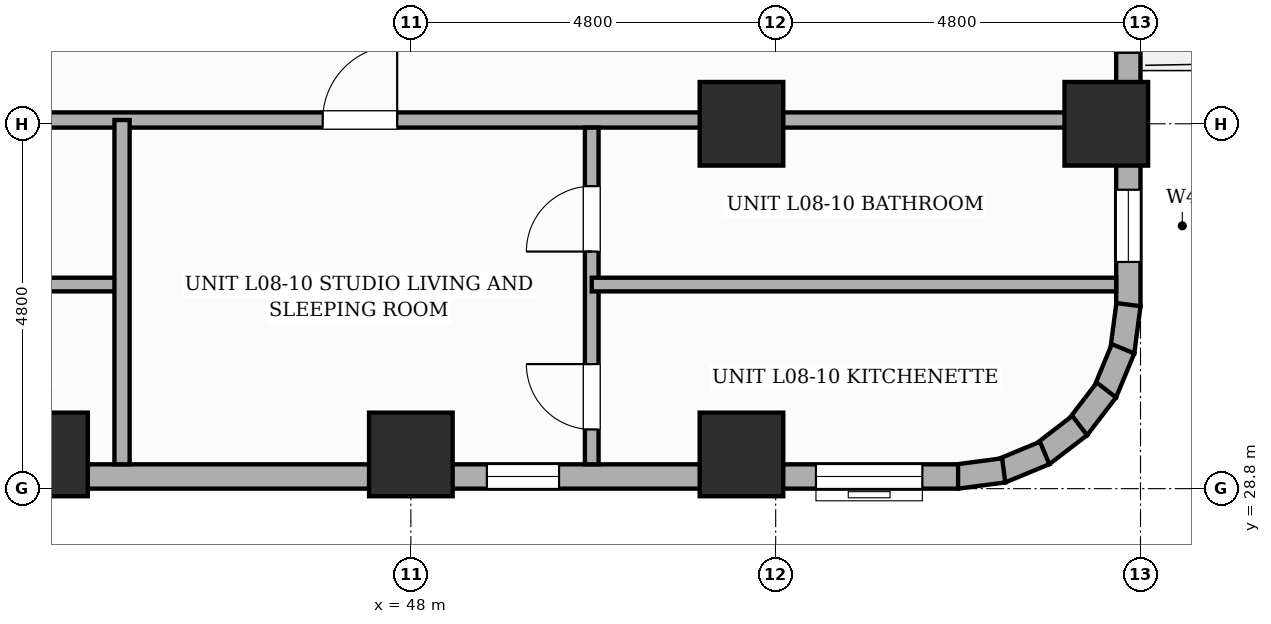
"""IFC4 building model, lengths in metres.
Left out: names, types, materials, properties, quantities, classifications, styles, units other than length and angle.
Written with IfcOpenShell. Run it as: python <this file> out.ifc"""

import sys

from ifc_helpers import new_model, si_unit, direction, frame, frame_2d, origin, origin_2d, place, context, subcontext, project, spatial, rectangle, extrude, element, fill, save


model = new_model("IFC4")
c1 = context("Model", 3, precision=1e-05, world=origin(), true_north=direction((0.0, 1.0)))
c2 = subcontext(c1, "Body", "Model", "MODEL_VIEW")
j1 = project(units=[si_unit("LENGTHUNIT", "METRE"), si_unit("PLANEANGLEUNIT", "RADIAN")], contexts=[c1])
p1 = place(None, origin())
s1 = spatial("IfcSite", under=j1, at=p1, CompositionType="ELEMENT")
p2 = place(p1, origin())
s2 = spatial("IfcBuilding", under=s1, at=p2, CompositionType="ELEMENT")
p3 = place(p2, frame((0.0, 0.0, 35.8)))
s3 = spatial("IfcBuildingStorey", under=s2, at=p3, CompositionType="ELEMENT", Elevation=35.8)
for number, where, z_axis, x_axis in (
    (1, (43.2, 29.25, 0.0), (0.0, 0.0, 1.0), (1.0, 0.0, 0.0)),
    (2, (48.0, 29.25, 0.0), (0.0, 0.0, 1.0), (1.0, 0.0, 0.0)),
    (3, (52.35, 29.25, 0.0), (0.0, 0.0, 1.0), (1.0, 0.0, 0.0)),
    (4, (52.35, 33.6, 0.0), (0.0, 0.0, 1.0), (1.0, 0.0, 0.0)),
    (5, (57.15, 33.6, 0.0), (0.0, 0.0, 1.0), (1.0, 0.0, 0.0)),
):
    element("IfcColumn", number, at=place(p3, frame(where, z_axis=z_axis, x_axis=x_axis)), inside=s3, PredefinedType="COLUMN", context=c2, shape_type="SweptSolid", body=[
        extrude(rectangle(XDim=1.1, YDim=1.1, at=origin_2d()), origin(), (0.0, 0.0, 1.0), 3.6),
    ])
p4 = place(p3, frame((57.44, 45.6, 0.0), z_axis=(0.0, 0.0, 1.0), x_axis=(0.0, -1.0, 0.0)))
e6 = element("IfcWall", 6, at=p4, inside=s3, PredefinedType="STANDARD", context=c2, shape_type="SweptSolid", body=[
    extrude(rectangle(XDim=14.4, YDim=0.32, at=frame_2d((7.2, 0.0))), origin(), (0.0, 0.0, 1.0), 2.53),
])
p5 = place(p4, frame((8.3, 0.0, 0.0)))
e7 = element("IfcOpeningElement", 7, at=p5, cuts=e6, PredefinedType="OPENING", context=c2, shape_type="SweptSolid", body=[
    extrude(rectangle(XDim=1.1, YDim=2.15, at=frame_2d((0.55, 1.075))), frame((0.0, 0.17, 0.0), z_axis=(0.0, -1.0, 0.0), x_axis=(1.0, 0.0, 0.0)), (0.0, 0.0, 1.0), 0.34),
])
p6 = place(p4, frame((0.47, 0.0, 0.45)))
e8 = element("IfcOpeningElement", 8, at=p6, cuts=e6, PredefinedType="OPENING", context=c2, shape_type="SweptSolid", body=[
    extrude(rectangle(XDim=0.95, YDim=1.8, at=frame_2d((0.475, 0.9))), frame((0.0, 0.17, 0.0), z_axis=(0.0, -1.0, 0.0), x_axis=(1.0, 0.0, 0.0)), (0.0, 0.0, 1.0), 0.34),
])
p7 = place(p4, frame((10.115, 0.0, 0.45)))
e9 = element("IfcOpeningElement", 9, at=p7, cuts=e6, PredefinedType="OPENING", context=c2, shape_type="SweptSolid", body=[
    extrude(rectangle(XDim=0.95, YDim=1.8, at=frame_2d((0.475, 0.9))), frame((0.0, 0.17, 0.0), z_axis=(0.0, -1.0, 0.0), x_axis=(1.0, 0.0, 0.0)), (0.0, 0.0, 1.0), 0.34),
])
p8 = place(p4, frame((12.867, 0.0, 0.45)))
e10 = element("IfcOpeningElement", 10, at=p8, cuts=e6, PredefinedType="OPENING", context=c2, shape_type="SweptSolid", body=[
    extrude(rectangle(XDim=0.95, YDim=1.8, at=frame_2d((0.475, 0.9))), frame((0.0, 0.17, 0.0), z_axis=(0.0, -1.0, 0.0), x_axis=(1.0, 0.0, 0.0)), (0.0, 0.0, 1.0), 0.34),
])
p9 = place(p4, frame((4.799, 0.0, 0.65)))
e11 = element("IfcOpeningElement", 11, at=p9, cuts=e6, PredefinedType="OPENING", context=c2, shape_type="SweptSolid", body=[
    extrude(rectangle(XDim=1.4, YDim=1.1, at=frame_2d((0.7, 0.55))), frame((0.0, 0.17, 0.0), z_axis=(0.0, -1.0, 0.0), x_axis=(1.0, 0.0, 0.0)), (0.0, 0.0, 1.0), 0.34),
])
p10 = place(p4, frame((3.194, 0.0, 0.45)))
e12 = element("IfcOpeningElement", 12, at=p10, cuts=e6, PredefinedType="OPENING", context=c2, shape_type="SweptSolid", body=[
    extrude(rectangle(XDim=0.95, YDim=1.8, at=frame_2d((0.475, 0.9))), frame((0.0, 0.17, 0.0), z_axis=(0.0, -1.0, 0.0), x_axis=(1.0, 0.0, 0.0)), (0.0, 0.0, 1.0), 0.34),
])
p11 = place(p3, frame((57.441, 31.221, 0.0), z_axis=(0.0, 0.0, 1.0), x_axis=(-0.130504898859, -0.991447664465, 0.0)))
e13 = element("IfcWall", 13, at=p11, inside=s3, PredefinedType="STANDARD", context=c2, shape_type="SweptSolid", body=[
    extrude(rectangle(XDim=0.627, YDim=0.32, at=frame_2d((0.313, 0.0))), origin(), (0.0, 0.0, 1.0), 3.35),
])
p12 = place(p3, frame((57.37, 30.64, 0.0), z_axis=(0.0, 0.0, 1.0), x_axis=(-0.382787856107, -0.923836271867, 0.0)))
e14 = element("IfcWall", 14, at=p12, inside=s3, PredefinedType="STANDARD", context=c2, shape_type="SweptSolid", body=[
    extrude(rectangle(XDim=0.626, YDim=0.32, at=frame_2d((0.313, 0.0))), origin(), (0.0, 0.0, 1.0), 3.35),
])
p13 = place(p3, frame((57.152, 30.097, 0.0), z_axis=(0.0, 0.0, 1.0), x_axis=(-0.608693302629, -0.793405610854, 0.0)))
e15 = element("IfcWall", 15, at=p13, inside=s3, PredefinedType="STANDARD", context=c2, shape_type="SweptSolid", body=[
    extrude(rectangle(XDim=0.626, YDim=0.32, at=frame_2d((0.313, 0.0))), origin(), (0.0, 0.0, 1.0), 3.35),
])
p14 = place(p3, frame((56.8, 29.63, 0.0), z_axis=(0.0, 0.0, 1.0), x_axis=(-0.793361818833, -0.608750379399, 0.0)))
e16 = element("IfcWall", 16, at=p14, inside=s3, PredefinedType="STANDARD", context=c2, shape_type="SweptSolid", body=[
    extrude(rectangle(XDim=0.627, YDim=0.32, at=frame_2d((0.313, 0.0))), origin(), (0.0, 0.0, 1.0), 3.35),
])
for number, where, z_axis, x_axis in (
    (17, (56.339, 29.269, 0.0), (0.0, 0.0, 1.0), (-0.924, -0.383, 0.0)),
    (18, (55.8, 29.04, 0.0), (0.0, 0.0, 1.0), (-0.991, -0.131, 0.0)),
):
    element("IfcWall", number, at=place(p3, frame(where, z_axis=z_axis, x_axis=x_axis)), inside=s3, PredefinedType="STANDARD", context=c2, shape_type="SweptSolid", body=[
        extrude(rectangle(XDim=0.626, YDim=0.32, at=frame_2d((0.313, 0.0))), origin(), (0.0, 0.0, 1.0), 3.35),
    ])
p15 = place(p3, frame((55.2, 28.96, 0.0), z_axis=(0.0, 0.0, 1.0), x_axis=(-1.0, 0.0, 0.0)))
e19 = element("IfcWall", 19, at=p15, inside=s3, PredefinedType="STANDARD", context=c2, shape_type="SweptSolid", body=[
    extrude(rectangle(XDim=28.8, YDim=0.32, at=frame_2d((14.4, 0.0))), origin(), (0.0, 0.0, 1.0), 2.53),
])
p16 = place(p15, frame((23.415, 0.0, 0.65)))
e20 = element("IfcOpeningElement", 20, at=p16, cuts=e19, PredefinedType="OPENING", context=c2, shape_type="SweptSolid", body=[
    extrude(rectangle(XDim=1.4, YDim=1.1, at=frame_2d((0.7, 0.55))), frame((0.0, 0.17, 0.0), z_axis=(0.0, -1.0, 0.0), x_axis=(1.0, 0.0, 0.0)), (0.0, 0.0, 1.0), 0.34),
])
p17 = place(p15, frame((15.034, 0.0, 0.45)))
e21 = element("IfcOpeningElement", 21, at=p17, cuts=e19, PredefinedType="OPENING", context=c2, shape_type="SweptSolid", body=[
    extrude(rectangle(XDim=0.95, YDim=1.8, at=frame_2d((0.475, 0.9))), frame((0.0, 0.17, 0.0), z_axis=(0.0, -1.0, 0.0), x_axis=(1.0, 0.0, 0.0)), (0.0, 0.0, 1.0), 0.34),
])
p18 = place(p15, frame((5.25, 0.0, 0.45)))
e22 = element("IfcOpeningElement", 22, at=p18, cuts=e19, PredefinedType="OPENING", context=c2, shape_type="SweptSolid", body=[
    extrude(rectangle(XDim=0.95, YDim=1.8, at=frame_2d((0.475, 0.9))), frame((0.0, 0.17, 0.0), z_axis=(0.0, -1.0, 0.0), x_axis=(1.0, 0.0, 0.0)), (0.0, 0.0, 1.0), 0.34),
])
p19 = place(p15, frame((12.979, 0.0, 0.65)))
e23 = element("IfcOpeningElement", 23, at=p19, cuts=e19, PredefinedType="OPENING", context=c2, shape_type="SweptSolid", body=[
    extrude(rectangle(XDim=1.4, YDim=1.1, at=frame_2d((0.7, 0.55))), frame((0.0, 0.17, 0.0), z_axis=(0.0, -1.0, 0.0), x_axis=(1.0, 0.0, 0.0)), (0.0, 0.0, 1.0), 0.34),
])
p20 = place(p15, frame((0.47, 0.0, 0.65)))
e24 = element("IfcOpeningElement", 24, at=p20, cuts=e19, PredefinedType="OPENING", context=c2, shape_type="SweptSolid", body=[
    extrude(rectangle(XDim=1.4, YDim=1.1, at=frame_2d((0.7, 0.55))), frame((0.0, 0.17, 0.0), z_axis=(0.0, -1.0, 0.0), x_axis=(1.0, 0.0, 0.0)), (0.0, 0.0, 1.0), 0.34),
])
p21 = place(p3, frame((22.75, 33.65, 0.0), z_axis=(0.0, 0.0, 1.0), x_axis=(1.0, 0.0, 0.0)))
e25 = element("IfcWall", 25, at=p21, inside=s3, PredefinedType="PARTITIONING", context=c2, shape_type="SweptSolid", body=[
    extrude(rectangle(XDim=34.53, YDim=0.2, at=frame_2d((17.265, 0.0))), origin(), (0.0, 0.0, 1.0), 2.53),
])
p22 = place(p21, frame((6.491, 0.0, 0.0)))
e26 = element("IfcOpeningElement", 26, at=p22, cuts=e25, PredefinedType="OPENING", context=c2, shape_type="SweptSolid", body=[
    extrude(rectangle(XDim=0.98, YDim=2.18, at=frame_2d((0.49, 1.09))), frame((0.0, 0.11, 0.0), z_axis=(0.0, -1.0, 0.0), x_axis=(1.0, 0.0, 0.0)), (0.0, 0.0, 1.0), 0.22),
])
p23 = place(p21, frame((13.406, 0.0, 0.0)))
e27 = element("IfcOpeningElement", 27, at=p23, cuts=e25, PredefinedType="OPENING", context=c2, shape_type="SweptSolid", body=[
    extrude(rectangle(XDim=0.98, YDim=2.18, at=frame_2d((0.49, 1.09))), frame((0.0, 0.11, 0.0), z_axis=(0.0, -1.0, 0.0), x_axis=(1.0, 0.0, 0.0)), (0.0, 0.0, 1.0), 0.22),
])
p24 = place(p21, frame((24.09, 0.0, 0.0)))
e28 = element("IfcOpeningElement", 28, at=p24, cuts=e25, PredefinedType="OPENING", context=c2, shape_type="SweptSolid", body=[
    extrude(rectangle(XDim=0.98, YDim=2.18, at=frame_2d((0.49, 1.09))), frame((0.0, 0.11, 0.0), z_axis=(0.0, -1.0, 0.0), x_axis=(1.0, 0.0, 0.0)), (0.0, 0.0, 1.0), 0.22),
])
p25 = place(p3, frame((40.412, 31.485, 0.0), z_axis=(0.0, 0.0, 1.0), x_axis=(1.0, 0.0, 0.0)))
e29 = element("IfcWall", 29, at=p25, inside=s3, PredefinedType="PLUMBINGWALL", context=c2, shape_type="SweptSolid", body=[
    extrude(rectangle(XDim=3.788, YDim=0.18, at=frame_2d((1.894, 0.0))), origin(), (0.0, 0.0, 1.0), 3.35),
])
p26 = place(p3, frame((44.2, 29.12, 0.0), z_axis=(0.0, 0.0, 1.0), x_axis=(0.0, 1.0, 0.0)))
e30 = element("IfcWall", 30, at=p26, inside=s3, PredefinedType="SOLIDWALL", context=c2, shape_type="SweptSolid", body=[
    extrude(rectangle(XDim=4.53, YDim=0.2, at=frame_2d((2.265, 0.0))), origin(), (0.0, 0.0, 1.0), 3.35),
])
p27 = place(p3, frame((50.38, 29.12, 0.0), z_axis=(0.0, 0.0, 1.0), x_axis=(0.0, 1.0, 0.0)))
e31 = element("IfcWall", 31, at=p27, inside=s3, PredefinedType="PLUMBINGWALL", context=c2, shape_type="SweptSolid", body=[
    extrude(rectangle(XDim=4.43, YDim=0.18, at=frame_2d((2.215, 0.0))), origin(), (0.0, 0.0, 1.0), 3.35),
])
p28 = place(p27, frame((0.459, 0.0, 0.0)))
e32 = element("IfcOpeningElement", 32, at=p28, cuts=e31, PredefinedType="OPENING", context=c2, shape_type="SweptSolid", body=[
    extrude(rectangle(XDim=0.86, YDim=2.1, at=frame_2d((0.43, 1.05))), frame((0.0, 0.1, 0.0), z_axis=(0.0, -1.0, 0.0), x_axis=(1.0, 0.0, 0.0)), (0.0, 0.0, 1.0), 0.2),
])
p29 = place(p27, frame((2.799, 0.0, 0.0)))
e33 = element("IfcOpeningElement", 33, at=p29, cuts=e31, PredefinedType="OPENING", context=c2, shape_type="SweptSolid", body=[
    extrude(rectangle(XDim=0.86, YDim=2.1, at=frame_2d((0.43, 1.05))), frame((0.0, 0.1, 0.0), z_axis=(0.0, -1.0, 0.0), x_axis=(1.0, 0.0, 0.0)), (0.0, 0.0, 1.0), 0.2),
])
p30 = place(p3, frame((50.38, 31.485, 0.0), z_axis=(0.0, 0.0, 1.0), x_axis=(1.0, 0.0, 0.0)))
e34 = element("IfcWall", 34, at=p30, inside=s3, PredefinedType="PLUMBINGWALL", context=c2, shape_type="SweptSolid", body=[
    extrude(rectangle(XDim=6.9, YDim=0.18, at=frame_2d((3.45, 0.0))), origin(), (0.0, 0.0, 1.0), 3.35),
])
p31 = place(p7, origin())
e35 = element("IfcWindow", 35, at=p31, inside=s3, PartitioningType="SINGLE_PANEL", PredefinedType="WINDOW", context=c2, shape_type="SweptSolid", body=[
    extrude(rectangle(XDim=0.95, YDim=1.8, at=frame_2d((0.475, 0.9))), frame((0.0, 0.03, 0.0), z_axis=(0.0, -1.0, 0.0), x_axis=(1.0, 0.0, 0.0)), (0.0, 0.0, 1.0), 0.06),
])
fill(e9, e35)
p32 = place(p8, origin())
e36 = element("IfcWindow", 36, at=p32, inside=s3, PartitioningType="SINGLE_PANEL", PredefinedType="WINDOW", context=c2, shape_type="SweptSolid", body=[
    extrude(rectangle(XDim=0.95, YDim=1.8, at=frame_2d((0.475, 0.9))), frame((0.0, 0.03, 0.0), z_axis=(0.0, -1.0, 0.0), x_axis=(1.0, 0.0, 0.0)), (0.0, 0.0, 1.0), 0.06),
])
fill(e10, e36)
p33 = place(p18, origin())
e37 = element("IfcWindow", 37, at=p33, inside=s3, PartitioningType="SINGLE_PANEL", PredefinedType="WINDOW", context=c2, shape_type="SweptSolid", body=[
    extrude(rectangle(XDim=0.95, YDim=1.8, at=frame_2d((0.475, 0.9))), frame((0.0, 0.03, 0.0), z_axis=(0.0, -1.0, 0.0), x_axis=(1.0, 0.0, 0.0)), (0.0, 0.0, 1.0), 0.06),
])
fill(e22, e37)
p34 = place(p20, origin())
e38 = element("IfcWindow", 38, at=p34, inside=s3, PartitioningType="SINGLE_PANEL", PredefinedType="WINDOW", context=c2, shape_type="SweptSolid", body=[
    extrude(rectangle(XDim=1.4, YDim=1.1, at=frame_2d((0.7, 0.55))), frame((0.0, 0.03, 0.0), z_axis=(0.0, -1.0, 0.0), x_axis=(1.0, 0.0, 0.0)), (0.0, 0.0, 1.0), 0.06),
])
fill(e24, e38)
p35 = place(p24, origin())
e39 = element("IfcDoor", 39, at=p35, inside=s3, OperationType="SINGLE_SWING_RIGHT", PredefinedType="DOOR", context=c2, shape_type="SweptSolid", body=[
    extrude(rectangle(XDim=0.98, YDim=2.18, at=frame_2d((0.49, 1.09))), frame((0.0, 0.025, 0.0), z_axis=(0.0, -1.0, 0.0), x_axis=(1.0, 0.0, 0.0)), (0.0, 0.0, 1.0), 0.05),
])
fill(e28, e39)
p36 = place(p28, origin())
e40 = element("IfcDoor", 40, at=p36, inside=s3, OperationType="SINGLE_SWING_RIGHT", PredefinedType="DOOR", context=c2, shape_type="SweptSolid", body=[
    extrude(rectangle(XDim=0.86, YDim=2.1, at=frame_2d((0.43, 1.05))), frame((0.0, 0.025, 0.0), z_axis=(0.0, -1.0, 0.0), x_axis=(1.0, 0.0, 0.0)), (0.0, 0.0, 1.0), 0.05),
])
fill(e32, e40)
p37 = place(p29, origin())
e41 = element("IfcDoor", 41, at=p37, inside=s3, OperationType="SINGLE_SWING_LEFT", PredefinedType="DOOR", context=c2, shape_type="SweptSolid", body=[
    extrude(rectangle(XDim=0.86, YDim=2.1, at=frame_2d((0.43, 1.05))), frame((0.0, 0.025, 0.0), z_axis=(0.0, -1.0, 0.0), x_axis=(1.0, 0.0, 0.0)), (0.0, 0.0, 1.0), 0.05),
])
fill(e33, e41)
save(model, sys.argv[1])
